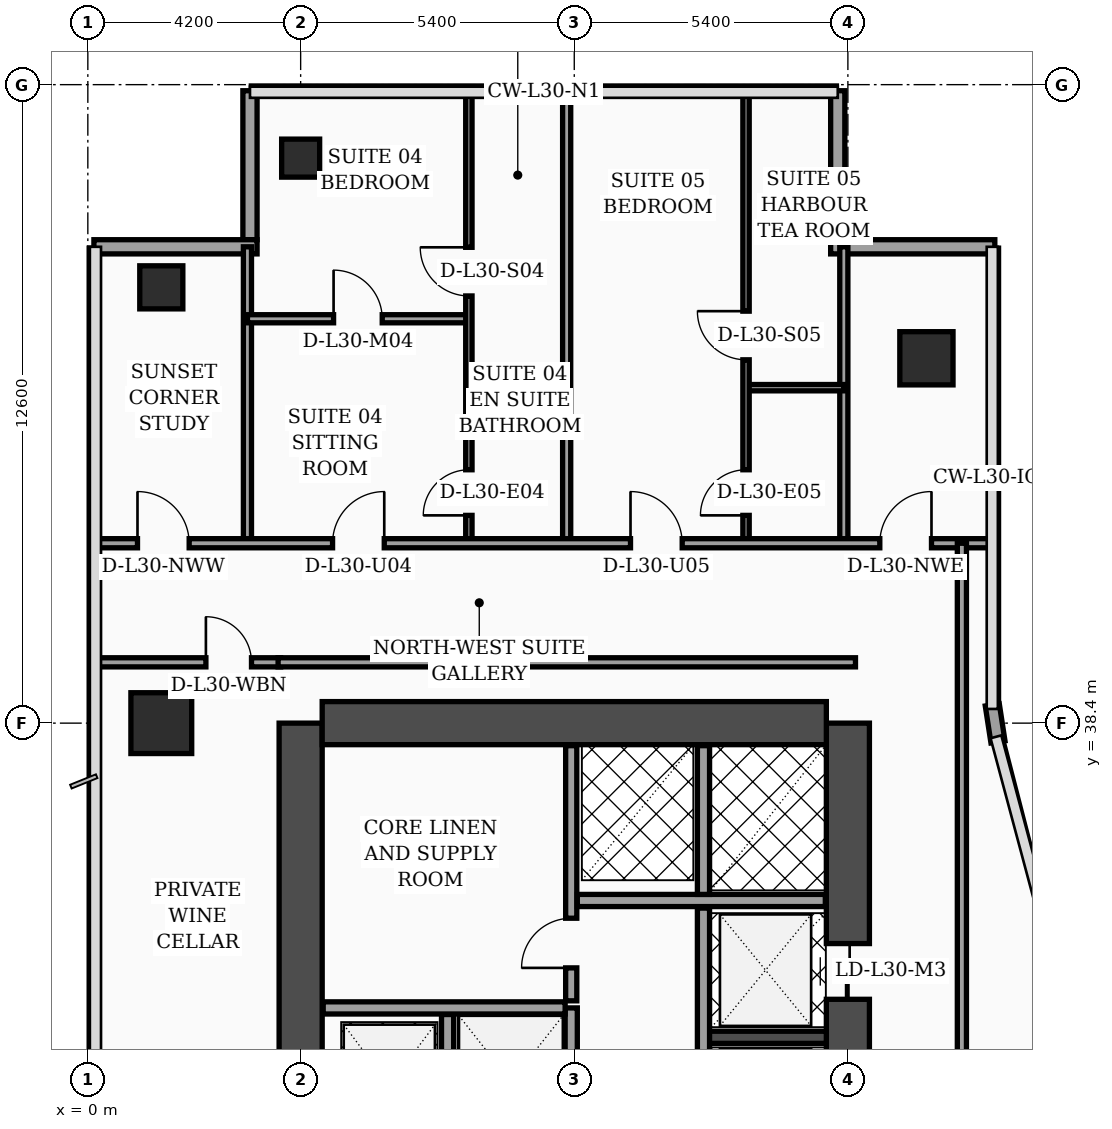
"""IFC4 building model, lengths in metres.
Left out: names, types, materials, properties, quantities, classifications, styles, units other than length and angle.
Written with IfcOpenShell. Run it as: python <this file> out.ifc"""

import sys

from ifc_helpers import new_model, si_unit, direction, frame, frame_2d, origin, origin_2d, place, context, subcontext, project, spatial, rectangle, hollow_rectangle, extrude, element, fill, save


model = new_model("IFC4")
c1 = context("Model", 3, precision=1e-05, world=origin(), true_north=direction((0.0, 1.0)))
c2 = subcontext(c1, "Body", "Model", "MODEL_VIEW")
j1 = project(units=[si_unit("LENGTHUNIT", "METRE"), si_unit("PLANEANGLEUNIT", "RADIAN")], contexts=[c1])
p1 = place(None, origin())
s1 = spatial("IfcSite", under=j1, at=p1, CompositionType="ELEMENT")
p2 = place(p1, origin())
s2 = spatial("IfcBuilding", under=s1, at=p2, CompositionType="ELEMENT")
p3 = place(p2, frame((0.0, 0.0, 124.0)))
s3 = spatial("IfcBuildingStorey", under=s2, at=p3, CompositionType="ELEMENT", Elevation=124.0)
p4 = place(p3, frame((4.2, 16.8, 0.0), z_axis=(0.0, 0.0, 1.0), x_axis=(0.0, 1.0, 0.0)))
e1 = element("IfcWall", 1, at=p4, inside=s3, PredefinedType="SHEAR", context=c2, shape_type="SweptSolid", body=[
    extrude(rectangle(XDim=21.6, YDim=0.85, at=frame_2d((10.8, 0.0))), origin(), (0.0, 0.0, 1.0), 3.56),
])
p5 = place(p3, frame((15.0, 16.8, 0.0), z_axis=(0.0, 0.0, 1.0), x_axis=(0.0, 1.0, 0.0)))
e2 = element("IfcWall", 2, at=p5, inside=s3, PredefinedType="SHEAR", context=c2, shape_type="SweptSolid", body=[
    extrude(rectangle(XDim=21.6, YDim=0.85, at=frame_2d((10.8, 0.0))), origin(), (0.0, 0.0, 1.0), 3.56),
])
p6 = place(p5, frame((8.65, 0.0, 0.0)))
e3 = element("IfcOpeningElement", 3, at=p6, cuts=e2, PredefinedType="OPENING", context=c2, shape_type="SweptSolid", body=[
    extrude(rectangle(XDim=1.1, YDim=2.2, at=frame_2d((0.55, 1.1))), frame((0.0, 0.435, 0.0), z_axis=(0.0, -1.0, 0.0), x_axis=(1.0, 0.0, 0.0)), (0.0, 0.0, 1.0), 0.87),
])
p7 = place(p5, frame((10.85, 0.0, 0.0)))
e4 = element("IfcOpeningElement", 4, at=p7, cuts=e2, PredefinedType="OPENING", context=c2, shape_type="SweptSolid", body=[
    extrude(rectangle(XDim=1.1, YDim=2.2, at=frame_2d((0.55, 1.1))), frame((0.0, 0.435, 0.0), z_axis=(0.0, -1.0, 0.0), x_axis=(1.0, 0.0, 0.0)), (0.0, 0.0, 1.0), 0.87),
])
p8 = place(p5, frame((13.5, 0.0, 0.0)))
e5 = element("IfcOpeningElement", 5, at=p8, cuts=e2, PredefinedType="OPENING", context=c2, shape_type="SweptSolid", body=[
    extrude(rectangle(XDim=1.1, YDim=2.2, at=frame_2d((0.55, 1.1))), frame((0.0, 0.435, 0.0), z_axis=(0.0, -1.0, 0.0), x_axis=(1.0, 0.0, 0.0)), (0.0, 0.0, 1.0), 0.87),
])
p9 = place(p5, frame((16.15, 0.0, 0.0)))
e6 = element("IfcOpeningElement", 6, at=p9, cuts=e2, PredefinedType="OPENING", context=c2, shape_type="SweptSolid", body=[
    extrude(rectangle(XDim=1.1, YDim=2.2, at=frame_2d((0.55, 1.1))), frame((0.0, 0.435, 0.0), z_axis=(0.0, -1.0, 0.0), x_axis=(1.0, 0.0, 0.0)), (0.0, 0.0, 1.0), 0.87),
])
p10 = place(p3, frame((4.625, 38.4, 0.0), z_axis=(0.0, 0.0, 1.0), x_axis=(1.0, 0.0, 0.0)))
e7 = element("IfcWall", 7, at=p10, inside=s3, PredefinedType="SHEAR", context=c2, shape_type="SweptSolid", body=[
    extrude(rectangle(XDim=9.95, YDim=0.85, at=frame_2d((4.975, 0.0))), origin(), (0.0, 0.0, 1.0), 3.56),
])
p11 = place(p3, frame((12.18, 32.2, 0.0), z_axis=(0.0, 0.0, 1.0), x_axis=(1.0, 0.0, 0.0)))
e8 = element("IfcWall", 8, at=p11, inside=s3, PredefinedType="SOLIDWALL", context=c2, shape_type="SweptSolid", body=[
    extrude(rectangle(XDim=2.395, YDim=0.24, at=frame_2d((1.198, 0.0))), origin(), (0.0, 0.0, 1.0), 3.56),
])
p12 = place(p3, frame((1.45, 38.4, 0.0), z_axis=(0.0, 0.0, 1.0), x_axis=(1.0, 0.0, 0.0)))
e9 = element("IfcColumn", 9, at=p12, inside=s3, PredefinedType="COLUMN", context=c2, shape_type="SweptSolid", body=[
    extrude(rectangle(XDim=1.2, YDim=1.2, at=origin_2d()), origin(), (0.0, 0.0, 1.0), 3.56),
])
p13 = place(p3, frame((1.45, 47.0, 0.0), z_axis=(0.0, 0.0, 1.0), x_axis=(1.0, 0.0, 0.0)))
e10 = element("IfcColumn", 10, at=p13, inside=s3, PredefinedType="COLUMN", context=c2, shape_type="SweptSolid", body=[
    extrude(hollow_rectangle(XDim=0.85, YDim=0.85, WallThickness=0.036, at=origin_2d()), origin(), (0.0, 0.0, 1.0), 3.56),
])
p14 = place(p3, frame((4.2, 49.55, 0.0), z_axis=(0.0, 0.0, 1.0), x_axis=(1.0, 0.0, 0.0)))
e11 = element("IfcColumn", 11, at=p14, inside=s3, PredefinedType="COLUMN", context=c2, shape_type="SweptSolid", body=[
    extrude(hollow_rectangle(XDim=0.75, YDim=0.75, WallThickness=0.032, at=origin_2d()), origin(), (0.0, 0.0, 1.0), 3.56),
])
p15 = place(p3, frame((16.55, 45.6, 0.0), z_axis=(0.0, 0.0, 1.0), x_axis=(1.0, 0.0, 0.0)))
e12 = element("IfcColumn", 12, at=p15, inside=s3, PredefinedType="COLUMN", context=c2, shape_type="SweptSolid", body=[
    extrude(rectangle(XDim=1.05, YDim=1.05, at=origin_2d()), origin(), (0.0, 0.0, 1.0), 3.56),
])
p16 = place(p3, frame((17.962, 38.03, 0.0), z_axis=(0.0, 0.0, 1.0), x_axis=(-0.15141125477, 0.988470855377, 0.0)))
e13 = element("IfcWall", 13, at=p16, inside=s3, PredefinedType="SOLIDWALL", context=c2, shape_type="SweptSolid", body=[
    extrude(rectangle(XDim=0.739, YDim=0.28, at=frame_2d((0.369, 0.0))), origin(), (0.0, 0.0, 1.0), 3.56),
])
p17 = place(p3, frame((17.9, 47.8, 0.0), z_axis=(0.0, 0.0, 1.0), x_axis=(-1.0, 0.0, 0.0)))
e14 = element("IfcWall", 14, at=p17, inside=s3, PredefinedType="SOLIDWALL", context=c2, shape_type="SweptSolid", body=[
    extrude(rectangle(XDim=3.24, YDim=0.28, at=frame_2d((1.62, 0.0))), origin(), (0.0, 0.0, 1.0), 3.56),
])
p18 = place(p3, frame((14.8, 47.94, 0.0), z_axis=(0.0, 0.0, 1.0), x_axis=(0.0, 1.0, 0.0)))
e15 = element("IfcWall", 15, at=p18, inside=s3, PredefinedType="SOLIDWALL", context=c2, shape_type="SweptSolid", body=[
    extrude(rectangle(XDim=2.94, YDim=0.28, at=frame_2d((1.47, 0.0))), origin(), (0.0, 0.0, 1.0), 3.56),
])
p19 = place(p3, frame((3.2, 50.88, 0.0), z_axis=(0.0, 0.0, 1.0), x_axis=(0.0, -1.0, 0.0)))
e16 = element("IfcWall", 16, at=p19, inside=s3, PredefinedType="SOLIDWALL", context=c2, shape_type="SweptSolid", body=[
    extrude(rectangle(XDim=2.94, YDim=0.28, at=frame_2d((1.47, 0.0))), origin(), (0.0, 0.0, 1.0), 3.04),
])
p20 = place(p3, frame((3.34, 47.8, 0.0), z_axis=(0.0, 0.0, 1.0), x_axis=(-1.0, 0.0, 0.0)))
e17 = element("IfcWall", 17, at=p20, inside=s3, PredefinedType="SOLIDWALL", context=c2, shape_type="SweptSolid", body=[
    extrude(rectangle(XDim=3.22, YDim=0.28, at=frame_2d((1.61, 0.0))), origin(), (0.0, 0.0, 1.0), 3.04),
])
p21 = place(p3, frame((7.1, 30.02, 0.0), z_axis=(0.0, 0.0, 1.0), x_axis=(0.0, 1.0, 0.0)))
e18 = element("IfcWall", 18, at=p21, inside=s3, PredefinedType="SOLIDWALL", context=c2, shape_type="SweptSolid", body=[
    extrude(rectangle(XDim=2.63, YDim=0.24, at=frame_2d((1.315, 0.0))), origin(), (0.0, 0.0, 1.0), 3.56),
])
p22 = place(p3, frame((9.54, 29.88, 0.0), z_axis=(0.0, 0.0, 1.0), x_axis=(0.0, 1.0, 0.0)))
e19 = element("IfcWall", 19, at=p22, inside=s3, PredefinedType="SOLIDWALL", context=c2, shape_type="SweptSolid", body=[
    extrude(rectangle(XDim=2.9, YDim=0.24, at=frame_2d((1.45, 0.0))), origin(), (0.0, 0.0, 1.0), 3.56),
])
p23 = place(p22, frame((0.7, 0.0, 0.0)))
e20 = element("IfcOpeningElement", 20, at=p23, cuts=e19, PredefinedType="OPENING", context=c2, shape_type="SweptSolid", body=[
    extrude(rectangle(XDim=1.3, YDim=2.35, at=frame_2d((0.65, 1.175))), frame((0.0, 0.13, 0.0), z_axis=(0.0, -1.0, 0.0), x_axis=(1.0, 0.0, 0.0)), (0.0, 0.0, 1.0), 0.26),
])
p24 = place(p3, frame((4.645, 32.78, 0.0), z_axis=(0.0, 0.0, 1.0), x_axis=(1.0, 0.0, 0.0)))
e21 = element("IfcWall", 21, at=p24, inside=s3, PredefinedType="SOLIDWALL", context=c2, shape_type="SweptSolid", body=[
    extrude(rectangle(XDim=4.775, YDim=0.24, at=frame_2d((2.387, 0.0))), origin(), (0.0, 0.0, 1.0), 3.19),
])
p25 = place(p3, frame((9.54, 32.92, 0.0), z_axis=(0.0, 0.0, 1.0), x_axis=(0.0, 1.0, 0.0)))
e22 = element("IfcWall", 22, at=p25, inside=s3, PredefinedType="SOLIDWALL", context=c2, shape_type="SweptSolid", body=[
    extrude(rectangle(XDim=5.035, YDim=0.22, at=frame_2d((2.518, 0.0))), origin(), (0.0, 0.0, 1.0), 3.56),
])
p26 = place(p25, frame((0.65, 0.0, 0.0)))
e23 = element("IfcOpeningElement", 23, at=p26, cuts=e22, PredefinedType="OPENING", context=c2, shape_type="SweptSolid", body=[
    extrude(rectangle(XDim=0.98, YDim=2.15, at=frame_2d((0.49, 1.075))), frame((0.0, 0.12, 0.0), z_axis=(0.0, -1.0, 0.0), x_axis=(1.0, 0.0, 0.0)), (0.0, 0.0, 1.0), 0.24),
])
p27 = place(p3, frame((12.15, 27.0, 0.0), z_axis=(0.0, 0.0, 1.0), x_axis=(0.0, 1.0, 0.0)))
e24 = element("IfcWall", 24, at=p27, inside=s3, PredefinedType="SOLIDWALL", context=c2, shape_type="SweptSolid", body=[
    extrude(rectangle(XDim=7.75, YDim=0.24, at=frame_2d((3.875, 0.0))), origin(), (0.0, 0.0, 1.0), 3.56),
])
p28 = place(p3, frame((9.66, 34.9, 0.0), z_axis=(0.0, 0.0, 1.0), x_axis=(1.0, 0.0, 0.0)))
e25 = element("IfcWall", 25, at=p28, inside=s3, PredefinedType="SOLIDWALL", context=c2, shape_type="SweptSolid", body=[
    extrude(rectangle(XDim=4.895, YDim=0.24, at=frame_2d((2.448, 0.0))), origin(), (0.0, 0.0, 1.0), 3.56),
])
p29 = place(p3, frame((12.15, 35.02, 0.0), z_axis=(0.0, 0.0, 1.0), x_axis=(0.0, 1.0, 0.0)))
e26 = element("IfcWall", 26, at=p29, inside=s3, PredefinedType="SOLIDWALL", context=c2, shape_type="SweptSolid", body=[
    extrude(rectangle(XDim=2.935, YDim=0.24, at=frame_2d((1.468, 0.0))), origin(), (0.0, 0.0, 1.0), 3.56),
])
p30 = place(p3, frame((0.08, 39.6, 0.0), z_axis=(0.0, 0.0, 1.0), x_axis=(1.0, 0.0, 0.0)))
e27 = element("IfcWall", 27, at=p30, inside=s3, PredefinedType="PARTITIONING", context=c2, shape_type="SweptSolid", body=[
    extrude(rectangle(XDim=3.725, YDim=0.18, at=frame_2d((1.862, 0.0))), origin(), (0.0, 0.0, 1.0), 2.84),
])
p31 = place(p30, frame((2.25, 0.0, 0.0)))
e28 = element("IfcOpeningElement", 28, at=p31, cuts=e27, PredefinedType="OPENING", context=c2, shape_type="SweptSolid", body=[
    extrude(rectangle(XDim=0.9, YDim=2.15, at=frame_2d((0.45, 1.075))), frame((0.0, 0.1, 0.0), z_axis=(0.0, -1.0, 0.0), x_axis=(1.0, 0.0, 0.0)), (0.0, 0.0, 1.0), 0.2),
])
p32 = place(p3, frame((3.15, 41.95, 0.0), z_axis=(0.0, 0.0, 1.0), x_axis=(0.0, 1.0, 0.0)))
e29 = element("IfcWall", 29, at=p32, inside=s3, PredefinedType="PARTITIONING", context=c2, shape_type="SweptSolid", body=[
    extrude(rectangle(XDim=5.85, YDim=0.16, at=frame_2d((2.925, 0.0))), origin(), (0.0, 0.0, 1.0), 3.14),
])
p33 = place(p3, frame((14.92, 41.95, 0.0), z_axis=(0.0, 0.0, 1.0), x_axis=(0.0, 1.0, 0.0)))
e30 = element("IfcWall", 30, at=p33, inside=s3, PredefinedType="PARTITIONING", context=c2, shape_type="SweptSolid", body=[
    extrude(rectangle(XDim=5.85, YDim=0.16, at=frame_2d((2.925, 0.0))), origin(), (0.0, 0.0, 1.0), 3.04),
])
p34 = place(p3, frame((7.52, 45.02, 0.0), z_axis=(0.0, 0.0, 1.0), x_axis=(1.0, 0.0, 0.0)))
e31 = element("IfcWall", 31, at=p34, inside=s3, PredefinedType="PARTITIONING", context=c2, shape_type="SweptSolid", body=[
    extrude(rectangle(XDim=1.93, YDim=0.125, at=frame_2d((0.965, 0.0))), origin(), (0.0, 0.0, 1.0), 3.56),
])
p35 = place(p3, frame((3.15, 46.38, 0.0), z_axis=(0.0, 0.0, 1.0), x_axis=(1.0, 0.0, 0.0)))
e32 = element("IfcWall", 32, at=p35, inside=s3, PredefinedType="PARTITIONING", context=c2, shape_type="SweptSolid", body=[
    extrude(rectangle(XDim=4.37, YDim=0.16, at=frame_2d((2.185, 0.0))), origin(), (0.0, 0.0, 1.0), 2.84),
])
p36 = place(p35, frame((1.7, 0.0, 0.0)))
e33 = element("IfcOpeningElement", 33, at=p36, cuts=e32, PredefinedType="OPENING", context=c2, shape_type="SweptSolid", body=[
    extrude(rectangle(XDim=0.96, YDim=2.2, at=frame_2d((0.48, 1.1))), frame((0.0, 0.09, 0.0), z_axis=(0.0, -1.0, 0.0), x_axis=(1.0, 0.0, 0.0)), (0.0, 0.0, 1.0), 0.18),
])
p37 = place(p3, frame((7.52, 41.95, 0.0), z_axis=(0.0, 0.0, 1.0), x_axis=(0.0, 1.0, 0.0)))
e34 = element("IfcWall", 34, at=p37, inside=s3, PredefinedType="PARTITIONING", context=c2, shape_type="SweptSolid", body=[
    extrude(rectangle(XDim=8.99, YDim=0.125, at=frame_2d((4.495, 0.0))), origin(), (0.0, 0.0, 1.0), 3.04),
])
p38 = place(p37, frame((0.55, 0.0, 0.0)))
e35 = element("IfcOpeningElement", 35, at=p38, cuts=e34, PredefinedType="OPENING", context=c2, shape_type="SweptSolid", body=[
    extrude(rectangle(XDim=0.9, YDim=2.15, at=frame_2d((0.45, 1.075))), frame((0.0, 0.073, 0.0), z_axis=(0.0, -1.0, 0.0), x_axis=(1.0, 0.0, 0.0)), (0.0, 0.0, 1.0), 0.145),
])
p39 = place(p37, frame((4.88, 0.0, 0.0)))
e36 = element("IfcOpeningElement", 36, at=p39, cuts=e34, PredefinedType="OPENING", context=c2, shape_type="SweptSolid", body=[
    extrude(rectangle(XDim=0.96, YDim=2.2, at=frame_2d((0.48, 1.1))), frame((0.0, 0.073, 0.0), z_axis=(0.0, -1.0, 0.0), x_axis=(1.0, 0.0, 0.0)), (0.0, 0.0, 1.0), 0.145),
])
p40 = place(p3, frame((12.99, 45.02, 0.0), z_axis=(0.0, 0.0, 1.0), x_axis=(1.0, 0.0, 0.0)))
e37 = element("IfcWall", 37, at=p40, inside=s3, PredefinedType="PARTITIONING", context=c2, shape_type="SweptSolid", body=[
    extrude(rectangle(XDim=1.93, YDim=0.125, at=frame_2d((0.965, 0.0))), origin(), (0.0, 0.0, 1.0), 3.56),
])
p41 = place(p3, frame((12.99, 41.95, 0.0), z_axis=(0.0, 0.0, 1.0), x_axis=(0.0, 1.0, 0.0)))
e38 = element("IfcWall", 38, at=p41, inside=s3, PredefinedType="PARTITIONING", context=c2, shape_type="SweptSolid", body=[
    extrude(rectangle(XDim=8.99, YDim=0.125, at=frame_2d((4.495, 0.0))), origin(), (0.0, 0.0, 1.0), 3.04),
])
p42 = place(p41, frame((0.55, 0.0, 0.0)))
e39 = element("IfcOpeningElement", 39, at=p42, cuts=e38, PredefinedType="OPENING", context=c2, shape_type="SweptSolid", body=[
    extrude(rectangle(XDim=0.9, YDim=2.15, at=frame_2d((0.45, 1.075))), frame((0.0, 0.073, 0.0), z_axis=(0.0, -1.0, 0.0), x_axis=(1.0, 0.0, 0.0)), (0.0, 0.0, 1.0), 0.145),
])
p43 = place(p41, frame((3.62, 0.0, 0.0)))
e40 = element("IfcOpeningElement", 40, at=p43, cuts=e38, PredefinedType="OPENING", context=c2, shape_type="SweptSolid", body=[
    extrude(rectangle(XDim=0.96, YDim=2.2, at=frame_2d((0.48, 1.1))), frame((0.0, 0.073, 0.0), z_axis=(0.0, -1.0, 0.0), x_axis=(1.0, 0.0, 0.0)), (0.0, 0.0, 1.0), 0.145),
])
p44 = place(p3, frame((9.45, 41.95, 0.0), z_axis=(0.0, 0.0, 1.0), x_axis=(0.0, 1.0, 0.0)))
e41 = element("IfcWall", 41, at=p44, inside=s3, PredefinedType="PARTITIONING", context=c2, shape_type="SweptSolid", body=[
    extrude(rectangle(XDim=8.99, YDim=0.16, at=frame_2d((4.495, 0.0))), origin(), (0.0, 0.0, 1.0), 3.04),
])
p45 = place(p3, frame((0.08, 41.95, 0.0), z_axis=(0.0, 0.0, 1.0), x_axis=(1.0, 0.0, 0.0)))
e42 = element("IfcWall", 42, at=p45, inside=s3, PredefinedType="PARTITIONING", context=c2, shape_type="SweptSolid", body=[
    extrude(rectangle(XDim=17.77, YDim=0.18, at=frame_2d((8.885, 0.0))), origin(), (0.0, 0.0, 1.0), 2.84),
])
p46 = place(p45, frame((0.9, 0.0, 0.0)))
e43 = element("IfcOpeningElement", 43, at=p46, cuts=e42, PredefinedType="OPENING", context=c2, shape_type="SweptSolid", body=[
    extrude(rectangle(XDim=1.02, YDim=2.2, at=frame_2d((0.51, 1.1))), frame((0.0, 0.1, 0.0), z_axis=(0.0, -1.0, 0.0), x_axis=(1.0, 0.0, 0.0)), (0.0, 0.0, 1.0), 0.2),
])
p47 = place(p45, frame((4.75, 0.0, 0.0)))
e44 = element("IfcOpeningElement", 44, at=p47, cuts=e42, PredefinedType="OPENING", context=c2, shape_type="SweptSolid", body=[
    extrude(rectangle(XDim=1.02, YDim=2.2, at=frame_2d((0.51, 1.1))), frame((0.0, 0.1, 0.0), z_axis=(0.0, -1.0, 0.0), x_axis=(1.0, 0.0, 0.0)), (0.0, 0.0, 1.0), 0.2),
])
p48 = place(p45, frame((10.63, 0.0, 0.0)))
e45 = element("IfcOpeningElement", 45, at=p48, cuts=e42, PredefinedType="OPENING", context=c2, shape_type="SweptSolid", body=[
    extrude(rectangle(XDim=1.02, YDim=2.2, at=frame_2d((0.51, 1.1))), frame((0.0, 0.1, 0.0), z_axis=(0.0, -1.0, 0.0), x_axis=(1.0, 0.0, 0.0)), (0.0, 0.0, 1.0), 0.2),
])
p49 = place(p45, frame((15.55, 0.0, 0.0)))
e46 = element("IfcOpeningElement", 46, at=p49, cuts=e42, PredefinedType="OPENING", context=c2, shape_type="SweptSolid", body=[
    extrude(rectangle(XDim=1.02, YDim=2.2, at=frame_2d((0.51, 1.1))), frame((0.0, 0.1, 0.0), z_axis=(0.0, -1.0, 0.0), x_axis=(1.0, 0.0, 0.0)), (0.0, 0.0, 1.0), 0.2),
])
p50 = place(p3, frame((17.25, 24.3, 0.0), z_axis=(0.0, 0.0, 1.0), x_axis=(0.0, 1.0, 0.0)))
e47 = element("IfcWall", 47, at=p50, inside=s3, PredefinedType="PARTITIONING", context=c2, shape_type="SweptSolid", body=[
    extrude(rectangle(XDim=17.65, YDim=0.18, at=frame_2d((8.825, 0.0))), origin(), (0.0, 0.0, 1.0), 2.84),
])
p51 = place(p3, frame((3.755, 39.6, 0.0), z_axis=(0.0, 0.0, 1.0), x_axis=(1.0, 0.0, 0.0)))
e48 = element("IfcWall", 48, at=p51, inside=s3, PredefinedType="PARTITIONING", context=c2, shape_type="SweptSolid", body=[
    extrude(rectangle(XDim=11.395, YDim=0.18, at=frame_2d((5.698, 0.0))), origin(), (0.0, 0.0, 1.0), 2.84),
])
p52 = place(p26, origin())
e49 = element("IfcDoor", 49, at=p52, inside=s3, OperationType="SINGLE_SWING_LEFT", PredefinedType="DOOR", context=c2, shape_type="SweptSolid", body=[
    extrude(rectangle(XDim=0.98, YDim=2.15, at=frame_2d((0.49, 1.075))), frame((0.0, 0.025, 0.0), z_axis=(0.0, -1.0, 0.0), x_axis=(1.0, 0.0, 0.0)), (0.0, 0.0, 1.0), 0.05),
])
fill(e23, e49)
p53 = place(p31, origin())
e50 = element("IfcDoor", 50, at=p53, inside=s3, OperationType="SINGLE_SWING_LEFT", PredefinedType="DOOR", context=c2, shape_type="SweptSolid", body=[
    extrude(rectangle(XDim=0.9, YDim=2.15, at=frame_2d((0.45, 1.075))), frame((0.0, 0.025, 0.0), z_axis=(0.0, -1.0, 0.0), x_axis=(1.0, 0.0, 0.0)), (0.0, 0.0, 1.0), 0.05),
])
fill(e28, e50)
p54 = place(p36, origin())
e51 = element("IfcDoor", 51, at=p54, inside=s3, OperationType="SINGLE_SWING_LEFT", PredefinedType="DOOR", context=c2, shape_type="SweptSolid", body=[
    extrude(rectangle(XDim=0.96, YDim=2.2, at=frame_2d((0.48, 1.1))), frame((0.0, 0.025, 0.0), z_axis=(0.0, -1.0, 0.0), x_axis=(1.0, 0.0, 0.0)), (0.0, 0.0, 1.0), 0.05),
])
fill(e33, e51)
p55 = place(p38, origin())
e52 = element("IfcDoor", 52, at=p55, inside=s3, OperationType="SINGLE_SWING_LEFT", PredefinedType="DOOR", context=c2, shape_type="SweptSolid", body=[
    extrude(rectangle(XDim=0.9, YDim=2.15, at=frame_2d((0.45, 1.075))), frame((0.0, 0.025, 0.0), z_axis=(0.0, -1.0, 0.0), x_axis=(1.0, 0.0, 0.0)), (0.0, 0.0, 1.0), 0.05),
])
fill(e35, e52)
p56 = place(p39, origin())
e53 = element("IfcDoor", 53, at=p56, inside=s3, OperationType="SINGLE_SWING_RIGHT", PredefinedType="DOOR", context=c2, shape_type="SweptSolid", body=[
    extrude(rectangle(XDim=0.96, YDim=2.2, at=frame_2d((0.48, 1.1))), frame((0.0, 0.025, 0.0), z_axis=(0.0, -1.0, 0.0), x_axis=(1.0, 0.0, 0.0)), (0.0, 0.0, 1.0), 0.05),
])
fill(e36, e53)
p57 = place(p42, origin())
e54 = element("IfcDoor", 54, at=p57, inside=s3, OperationType="SINGLE_SWING_LEFT", PredefinedType="DOOR", context=c2, shape_type="SweptSolid", body=[
    extrude(rectangle(XDim=0.9, YDim=2.15, at=frame_2d((0.45, 1.075))), frame((0.0, 0.025, 0.0), z_axis=(0.0, -1.0, 0.0), x_axis=(1.0, 0.0, 0.0)), (0.0, 0.0, 1.0), 0.05),
])
fill(e39, e54)
p58 = place(p43, origin())
e55 = element("IfcDoor", 55, at=p58, inside=s3, OperationType="SINGLE_SWING_RIGHT", PredefinedType="DOOR", context=c2, shape_type="SweptSolid", body=[
    extrude(rectangle(XDim=0.96, YDim=2.2, at=frame_2d((0.48, 1.1))), frame((0.0, 0.025, 0.0), z_axis=(0.0, -1.0, 0.0), x_axis=(1.0, 0.0, 0.0)), (0.0, 0.0, 1.0), 0.05),
])
fill(e40, e55)
p59 = place(p46, origin())
e56 = element("IfcDoor", 56, at=p59, inside=s3, OperationType="SINGLE_SWING_LEFT", PredefinedType="DOOR", context=c2, shape_type="SweptSolid", body=[
    extrude(rectangle(XDim=1.02, YDim=2.2, at=frame_2d((0.51, 1.1))), frame((0.0, 0.025, 0.0), z_axis=(0.0, -1.0, 0.0), x_axis=(1.0, 0.0, 0.0)), (0.0, 0.0, 1.0), 0.05),
])
fill(e43, e56)
p60 = place(p47, origin())
e57 = element("IfcDoor", 57, at=p60, inside=s3, OperationType="SINGLE_SWING_RIGHT", PredefinedType="DOOR", context=c2, shape_type="SweptSolid", body=[
    extrude(rectangle(XDim=1.02, YDim=2.2, at=frame_2d((0.51, 1.1))), frame((0.0, 0.025, 0.0), z_axis=(0.0, -1.0, 0.0), x_axis=(1.0, 0.0, 0.0)), (0.0, 0.0, 1.0), 0.05),
])
fill(e44, e57)
p61 = place(p48, origin())
e58 = element("IfcDoor", 58, at=p61, inside=s3, OperationType="SINGLE_SWING_LEFT", PredefinedType="DOOR", context=c2, shape_type="SweptSolid", body=[
    extrude(rectangle(XDim=1.02, YDim=2.2, at=frame_2d((0.51, 1.1))), frame((0.0, 0.025, 0.0), z_axis=(0.0, -1.0, 0.0), x_axis=(1.0, 0.0, 0.0)), (0.0, 0.0, 1.0), 0.05),
])
fill(e45, e58)
p62 = place(p49, origin())
e59 = element("IfcDoor", 59, at=p62, inside=s3, OperationType="SINGLE_SWING_RIGHT", PredefinedType="DOOR", context=c2, shape_type="SweptSolid", body=[
    extrude(rectangle(XDim=1.02, YDim=2.2, at=frame_2d((0.51, 1.1))), frame((0.0, 0.025, 0.0), z_axis=(0.0, -1.0, 0.0), x_axis=(1.0, 0.0, 0.0)), (0.0, 0.0, 1.0), 0.05),
])
fill(e46, e59)
p63 = place(p9, origin())
e60 = element("IfcDoor", 60, at=p63, inside=s3, OperationType="DOUBLE_DOOR_SLIDING", PredefinedType="DOOR", context=c2, shape_type="SweptSolid", body=[
    extrude(rectangle(XDim=1.1, YDim=2.2, at=frame_2d((0.55, 1.1))), frame((0.0, 0.025, 0.0), z_axis=(0.0, -1.0, 0.0), x_axis=(1.0, 0.0, 0.0)), (0.0, 0.0, 1.0), 0.05),
])
fill(e6, e60)
save(model, sys.argv[1])
